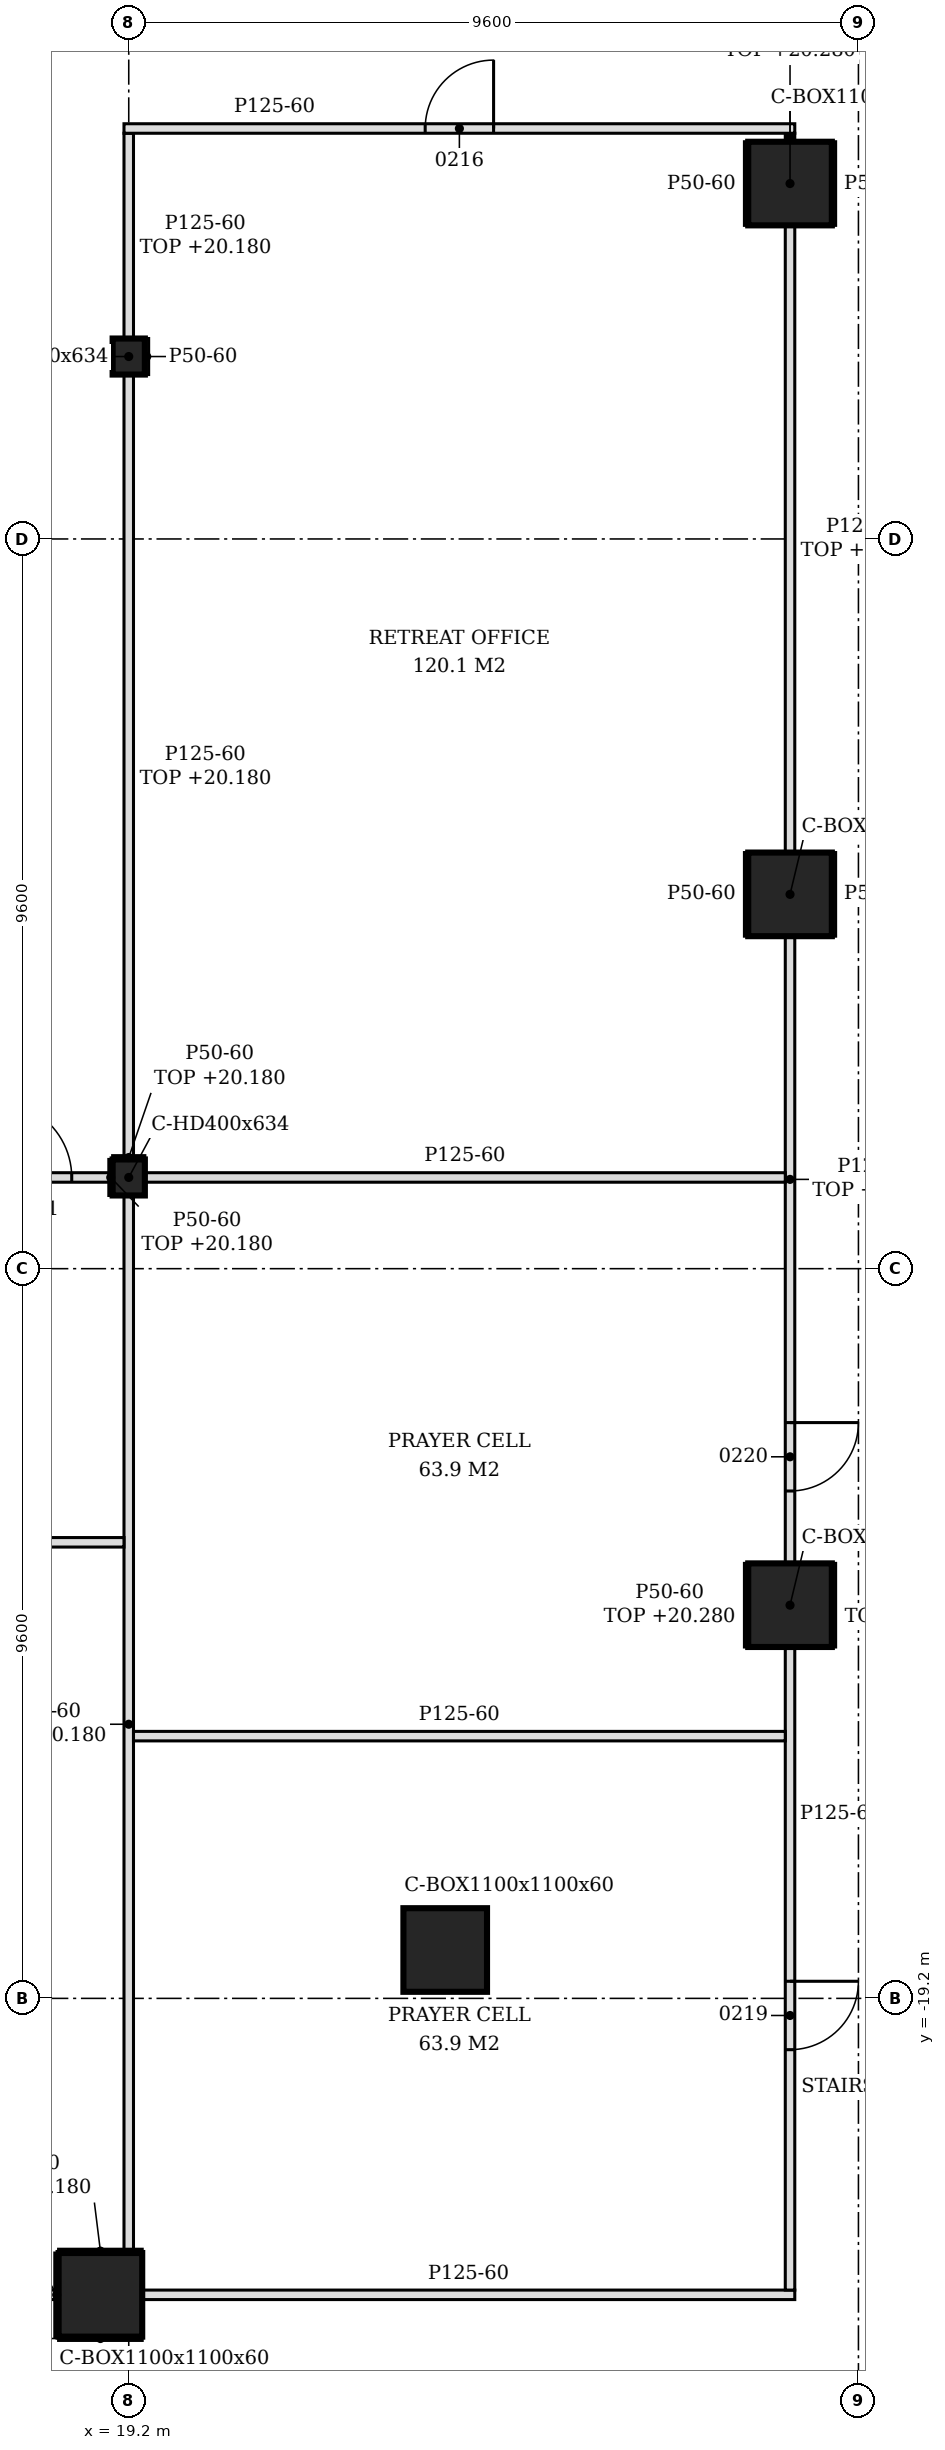
"""IFC4 building model, lengths in metres.
Left out: names, types, materials, properties, quantities, classifications, styles, units other than length and angle.
Written with IfcOpenShell. Run it as: python <this file> out.ifc"""

import sys

from ifc_helpers import new_model, si_unit, direction, frame, frame_2d, origin, origin_2d, place, context, subcontext, project, spatial, polyline, rectangle, hollow_rectangle, i_section, outline, extrude, element, fill, save


model = new_model("IFC4")
c1 = context("Model", 3, precision=1e-05, world=origin(), true_north=direction((0.0, 1.0)))
c2 = subcontext(c1, "Body", "Model", "MODEL_VIEW")
j1 = project(units=[si_unit("LENGTHUNIT", "METRE"), si_unit("PLANEANGLEUNIT", "RADIAN")], contexts=[c1])
p1 = place(None, origin())
s1 = spatial("IfcSite", under=j1, at=p1, CompositionType="ELEMENT")
p2 = place(p1, origin())
s2 = spatial("IfcBuilding", under=s1, at=p2, CompositionType="ELEMENT")
p3 = place(p2, frame((0.0, 0.0, 15.0)))
s3 = spatial("IfcBuildingStorey", under=s2, at=p3, CompositionType="ELEMENT", Elevation=15.0)
for number, where, z_axis, x_axis in (
    (1, (18.827, -23.1, -0.2), (0.0, 0.0, 1.0), (1.0, 0.0, 0.0)),
    (2, (23.364, -18.564, -0.2), (0.0, 0.0, 1.0), (1.0, 0.0, 0.0)),
    (3, (27.9, -14.027, -0.2), (0.0, 0.0, 1.0), (1.0, 0.0, 0.0)),
    (4, (27.9, -4.676, -0.2), (0.0, 0.0, 1.0), (1.0, 0.0, 0.0)),
    (5, (27.9, 4.676, -0.2), (0.0, 0.0, 1.0), (1.0, 0.0, 0.0)),
):
    element("IfcColumn", number, at=place(p3, frame(where, z_axis=z_axis, x_axis=x_axis)), inside=s3, PredefinedType="COLUMN", context=c2, shape_type="SweptSolid", body=[
        extrude(hollow_rectangle(XDim=1.1, YDim=1.1, WallThickness=0.06, at=origin_2d()), origin(), (0.0, 0.0, 1.0), 6.0),
    ])
for number, where, z_axis, x_axis in (
    (6, (19.2, -8.4, -0.2), (0.0, 0.0, 1.0), (1.0, 0.0, 0.0)),
    (7, (19.2, 2.4, -0.2), (0.0, 0.0, 1.0), (1.0, 0.0, 0.0)),
):
    element("IfcColumn", number, at=place(p3, frame(where, z_axis=z_axis, x_axis=x_axis)), inside=s3, PredefinedType="COLUMN", context=c2, shape_type="SweptSolid", body=[
        extrude(i_section(OverallWidth=0.424, OverallDepth=0.474, WebThickness=0.048, FlangeThickness=0.077, FilletRadius=0.015, at=origin_2d()), origin(), (0.0, 0.0, 1.0), 6.0),
    ])
p4 = place(p3, frame((9.964, -23.1, 0.0), z_axis=(0.0, 0.0, 1.0), x_axis=(1.0, 0.0, 0.0)))
e8 = element("IfcWall", 8, at=p4, inside=s3, PredefinedType="PARTITIONING", context=c2, shape_type="SweptSolid", body=[
    extrude(rectangle(XDim=8.313, YDim=0.125, at=frame_2d((4.157, 0.0))), origin(), (0.0, 0.0, 1.0), 5.28),
])
p5 = place(p4, frame((3.986, 0.0, 0.0)))
e9 = element("IfcOpeningElement", 9, at=p5, cuts=e8, PredefinedType="OPENING", context=c2, shape_type="SweptSolid", body=[
    extrude(rectangle(XDim=0.9, YDim=2.1, at=frame_2d((0.45, 1.05))), frame((0.0, 0.073, 0.0), z_axis=(0.0, -1.0, 0.0), x_axis=(1.0, 0.0, 0.0)), (0.0, 0.0, 1.0), 0.145),
])
p6 = place(p3, frame((19.377, -23.1, 0.0), z_axis=(0.0, 0.0, 1.0), x_axis=(1.0, 0.0, 0.0)))
e10 = element("IfcWall", 10, at=p6, inside=s3, PredefinedType="PARTITIONING", context=c2, shape_type="SweptSolid", body=[
    extrude(rectangle(XDim=8.585, YDim=0.125, at=frame_2d((4.292, 0.0))), origin(), (0.0, 0.0, 1.0), 5.8),
])
p7 = place(p3, frame((27.9, -23.038, 0.0), z_axis=(0.0, 0.0, 1.0), x_axis=(0.0, 1.0, 0.0)))
e11 = element("IfcWall", 11, at=p7, inside=s3, PredefinedType="PARTITIONING", context=c2, shape_type="SweptSolid", body=[
    extrude(outline(polyline([(0.0, 0.0), (8.46, 0.0), (8.46, 5.8), (3.927, 5.8), (3.926, 5.38), (3.748, 5.38), (3.746, 5.8), (0.0, 5.8), (0.0, 0.0)])), frame((0.0, 0.062, 0.0), z_axis=(0.0, -1.0, 0.0), x_axis=(1.0, 0.0, 0.0)), (0.0, 0.0, 1.0), 0.125),
])
p8 = place(p7, frame((3.163, 0.0, 0.0)))
e12 = element("IfcOpeningElement", 12, at=p8, cuts=e11, PredefinedType="OPENING", context=c2, shape_type="SweptSolid", body=[
    extrude(rectangle(XDim=0.9, YDim=2.1, at=frame_2d((0.45, 1.05))), frame((0.0, 0.073, 0.0), z_axis=(0.0, -1.0, 0.0), x_axis=(1.0, 0.0, 0.0)), (0.0, 0.0, 1.0), 0.145),
])
p9 = place(p3, frame((19.2, -22.55, 0.0), z_axis=(0.0, 0.0, 1.0), x_axis=(0.0, 1.0, 0.0)))
e13 = element("IfcWall", 13, at=p9, inside=s3, PredefinedType="PARTITIONING", context=c2, shape_type="SweptSolid", body=[
    extrude(rectangle(XDim=13.913, YDim=0.125, at=frame_2d((6.957, 0.0))), origin(), (0.0, 0.0, 1.0), 5.18),
])
p10 = place(p3, frame((19.262, -15.75, 0.0), z_axis=(0.0, 0.0, 1.0), x_axis=(1.0, 0.0, 0.0)))
e14 = element("IfcWall", 14, at=p10, inside=s3, PredefinedType="PARTITIONING", context=c2, shape_type="SweptSolid", body=[
    extrude(outline(polyline([(0.0, 0.0), (8.575, 0.0), (8.575, 5.8), (7.189, 5.8), (7.187, 5.28), (6.64, 5.28), (6.638, 5.8), (0.087, 5.8), (0.085, 5.18), (0.0, 5.18), (0.0, 0.0)])), frame((0.0, 0.062, 0.0), z_axis=(0.0, -1.0, 0.0), x_axis=(1.0, 0.0, 0.0)), (0.0, 0.0, 1.0), 0.125),
])
p11 = place(p3, frame((27.9, -13.477, 0.0), z_axis=(0.0, 0.0, 1.0), x_axis=(0.0, 1.0, 0.0)))
e15 = element("IfcWall", 15, at=p11, inside=s3, PredefinedType="PARTITIONING", context=c2, shape_type="SweptSolid", body=[
    extrude(rectangle(XDim=8.252, YDim=0.125, at=frame_2d((4.126, 0.0))), origin(), (0.0, 0.0, 1.0), 5.28),
])
p12 = place(p11, frame((0.952, 0.0, 0.0)))
e16 = element("IfcOpeningElement", 16, at=p12, cuts=e15, PredefinedType="OPENING", context=c2, shape_type="SweptSolid", body=[
    extrude(rectangle(XDim=0.9, YDim=2.1, at=frame_2d((0.45, 1.05))), frame((0.0, 0.073, 0.0), z_axis=(0.0, -1.0, 0.0), x_axis=(1.0, 0.0, 0.0)), (0.0, 0.0, 1.0), 0.145),
])
p13 = place(p3, frame((-4.738, -13.2, 0.0), z_axis=(0.0, 0.0, 1.0), x_axis=(1.0, 0.0, 0.0)))
e17 = element("IfcWall", 17, at=p13, inside=s3, PredefinedType="PARTITIONING", context=c2, shape_type="SweptSolid", body=[
    extrude(outline(polyline([(0.0, 0.0), (23.875, 0.0), (23.875, 5.18), (23.788, 5.18), (23.785, 5.8), (19.288, 5.8), (19.285, 5.18), (18.988, 5.18), (18.986, 5.8), (14.488, 5.8), (14.486, 5.18), (14.188, 5.18), (14.186, 5.8), (9.688, 5.8), (9.686, 5.18), (9.387, 5.18), (9.385, 5.8), (4.887, 5.8), (4.885, 5.18), (4.587, 5.18), (4.585, 5.8), (0.087, 5.8), (0.085, 5.18), (0.0, 5.18), (0.0, 0.0)])), frame((0.0, 0.062, 0.0), z_axis=(0.0, -1.0, 0.0), x_axis=(1.0, 0.0, 0.0)), (0.0, 0.0, 1.0), 0.125),
])
p14 = place(p3, frame((7.412, -8.4, 0.0), z_axis=(0.0, 0.0, 1.0), x_axis=(1.0, 0.0, 0.0)))
e18 = element("IfcWall", 18, at=p14, inside=s3, PredefinedType="PARTITIONING", context=c2, shape_type="SweptSolid", body=[
    extrude(rectangle(XDim=11.576, YDim=0.125, at=frame_2d((5.788, 0.0))), origin(), (0.0, 0.0, 1.0), 5.18),
])
p15 = place(p14, frame((4.138, 0.0, 0.0)))
e19 = element("IfcOpeningElement", 19, at=p15, cuts=e18, PredefinedType="OPENING", context=c2, shape_type="SweptSolid", body=[
    extrude(rectangle(XDim=0.8, YDim=2.1, at=frame_2d((0.4, 1.05))), frame((0.0, 0.073, 0.0), z_axis=(0.0, -1.0, 0.0), x_axis=(1.0, 0.0, 0.0)), (0.0, 0.0, 1.0), 0.145),
])
p16 = place(p14, frame((10.038, 0.0, 0.0)))
e20 = element("IfcOpeningElement", 20, at=p16, cuts=e18, PredefinedType="OPENING", context=c2, shape_type="SweptSolid", body=[
    extrude(rectangle(XDim=1.0, YDim=2.1, at=frame_2d((0.5, 1.05))), frame((0.0, 0.073, 0.0), z_axis=(0.0, -1.0, 0.0), x_axis=(1.0, 0.0, 0.0)), (0.0, 0.0, 1.0), 0.145),
])
p17 = place(p3, frame((19.412, -8.4, 0.0), z_axis=(0.0, 0.0, 1.0), x_axis=(1.0, 0.0, 0.0)))
e21 = element("IfcWall", 21, at=p17, inside=s3, PredefinedType="PARTITIONING", context=c2, shape_type="SweptSolid", body=[
    extrude(outline(polyline([(0.0, 0.0), (8.425, 0.0), (8.426, 5.28), (8.338, 5.28), (8.336, 5.8), (0.0, 5.8), (0.0, 0.0)])), frame((0.0, 0.062, 0.0), z_axis=(0.0, -1.0, 0.0), x_axis=(1.0, 0.0, 0.0)), (0.0, 0.0, 1.0), 0.125),
])
p18 = place(p3, frame((19.2, -8.163, 0.0), z_axis=(0.0, 0.0, 1.0), x_axis=(0.0, 1.0, 0.0)))
e22 = element("IfcWall", 22, at=p18, inside=s3, PredefinedType="PARTITIONING", context=c2, shape_type="SweptSolid", body=[
    extrude(rectangle(XDim=10.326, YDim=0.125, at=frame_2d((5.163, 0.0))), origin(), (0.0, 0.0, 1.0), 5.18),
])
p19 = place(p3, frame((27.9, -4.126, 0.0), z_axis=(0.0, 0.0, 1.0), x_axis=(0.0, 1.0, 0.0)))
e23 = element("IfcWall", 23, at=p19, inside=s3, PredefinedType="PARTITIONING", context=c2, shape_type="SweptSolid", body=[
    extrude(rectangle(XDim=8.251, YDim=0.125, at=frame_2d((4.126, 0.0))), origin(), (0.0, 0.0, 1.0), 5.28),
])
p20 = place(p3, frame((19.2, 2.637, 0.0), z_axis=(0.0, 0.0, 1.0), x_axis=(0.0, 1.0, 0.0)))
e24 = element("IfcWall", 24, at=p20, inside=s3, PredefinedType="PARTITIONING", context=c2, shape_type="SweptSolid", body=[
    extrude(rectangle(XDim=2.7, YDim=0.125, at=frame_2d((1.35, 0.0))), origin(), (0.0, 0.0, 1.0), 5.18),
])
p21 = place(p3, frame((27.9, 5.226, 0.0), z_axis=(0.0, 0.0, 1.0), x_axis=(0.0, 1.0, 0.0)))
e25 = element("IfcWall", 25, at=p21, inside=s3, PredefinedType="PARTITIONING", context=c2, shape_type="SweptSolid", body=[
    extrude(rectangle(XDim=0.112, YDim=0.125, at=frame_2d((0.056, 0.0))), origin(), (0.0, 0.0, 1.0), 5.28),
])
p22 = place(p3, frame((19.137, 5.4, 0.0), z_axis=(0.0, 0.0, 1.0), x_axis=(1.0, 0.0, 0.0)))
e26 = element("IfcWall", 26, at=p22, inside=s3, PredefinedType="PARTITIONING", context=c2, shape_type="SweptSolid", body=[
    extrude(outline(polyline([(0.0, 0.0), (8.825, 0.0), (8.825, 5.28), (8.613, 5.28), (8.611, 5.8), (4.962, 5.8), (4.96, 5.28), (4.762, 5.28), (4.76, 5.8), (0.212, 5.8), (0.21, 5.18), (0.0, 5.18), (0.0, 0.0)])), frame((0.0, 0.062, 0.0), z_axis=(0.0, -1.0, 0.0), x_axis=(1.0, 0.0, 0.0)), (0.0, 0.0, 1.0), 0.125),
])
p23 = place(p22, frame((3.962, 0.0, 0.0)))
e27 = element("IfcOpeningElement", 27, at=p23, cuts=e26, PredefinedType="OPENING", context=c2, shape_type="SweptSolid", body=[
    extrude(rectangle(XDim=0.9, YDim=2.1, at=frame_2d((0.45, 1.05))), frame((0.0, 0.073, 0.0), z_axis=(0.0, -1.0, 0.0), x_axis=(1.0, 0.0, 0.0)), (0.0, 0.0, 1.0), 0.145),
])
p24 = place(p3, frame((18.277, -22.525, 0.0), z_axis=(0.0, 0.0, 1.0), x_axis=(1.0, 0.0, 0.0)))
e28 = element("IfcWall", 28, at=p24, inside=s3, PredefinedType="PARTITIONING", context=c2, shape_type="SweptSolid", body=[
    extrude(rectangle(XDim=1.1, YDim=0.05, at=frame_2d((0.55, 0.0))), origin(), (0.0, 0.0, 1.0), 5.18),
])
p25 = place(p3, frame((18.277, -23.675, 0.0), z_axis=(0.0, 0.0, 1.0), x_axis=(1.0, 0.0, 0.0)))
e29 = element("IfcWall", 29, at=p25, inside=s3, PredefinedType="PARTITIONING", context=c2, shape_type="SweptSolid", body=[
    extrude(rectangle(XDim=1.1, YDim=0.05, at=frame_2d((0.55, 0.0))), origin(), (0.0, 0.0, 1.0), 5.42),
])
p26 = place(p3, frame((18.252, -23.65, 0.0), z_axis=(0.0, 0.0, 1.0), x_axis=(0.0, 1.0, 0.0)))
e30 = element("IfcWall", 30, at=p26, inside=s3, PredefinedType="PARTITIONING", context=c2, shape_type="SweptSolid", body=[
    extrude(rectangle(XDim=1.1, YDim=0.05, at=frame_2d((0.55, 0.0))), origin(), (0.0, 0.0, 1.0), 5.28),
])
p27 = place(p3, frame((18.963, -8.637, 0.0), z_axis=(0.0, 0.0, 1.0), x_axis=(0.0, 1.0, 0.0)))
e31 = element("IfcWall", 31, at=p27, inside=s3, PredefinedType="PARTITIONING", context=c2, shape_type="SweptSolid", body=[
    extrude(rectangle(XDim=0.474, YDim=0.05, at=frame_2d((0.237, 0.0))), origin(), (0.0, 0.0, 1.0), 5.18),
])
for number, where, z_axis, x_axis in (
    (32, (27.325, -14.577, 0.0), (0.0, 0.0, 1.0), (0.0, 1.0, 0.0)),
    (33, (28.475, -14.577, 0.0), (0.0, 0.0, 1.0), (0.0, 1.0, 0.0)),
):
    element("IfcWall", number, at=place(p3, frame(where, z_axis=z_axis, x_axis=x_axis)), inside=s3, PredefinedType="PARTITIONING", context=c2, shape_type="SweptSolid", body=[
        extrude(rectangle(XDim=1.1, YDim=0.05, at=frame_2d((0.55, 0.0))), origin(), (0.0, 0.0, 1.0), 5.28),
    ])
for number, where, z_axis, x_axis in (
    (34, (27.325, -5.226, 0.0), (0.0, 0.0, 1.0), (0.0, 1.0, 0.0)),
    (35, (28.475, -5.226, 0.0), (0.0, 0.0, 1.0), (0.0, 1.0, 0.0)),
    (36, (27.325, 4.126, 0.0), (0.0, 0.0, 1.0), (0.0, 1.0, 0.0)),
    (37, (28.475, 4.126, 0.0), (0.0, 0.0, 1.0), (0.0, 1.0, 0.0)),
):
    element("IfcWall", number, at=place(p3, frame(where, z_axis=z_axis, x_axis=x_axis)), inside=s3, PredefinedType="PARTITIONING", context=c2, shape_type="SweptSolid", body=[
        extrude(rectangle(XDim=1.1, YDim=0.05, at=frame_2d((0.55, 0.0))), origin(), (0.0, 0.0, 1.0), 5.8),
    ])
p28 = place(p3, frame((18.988, -8.138, 0.0), z_axis=(0.0, 0.0, 1.0), x_axis=(1.0, 0.0, 0.0)))
e38 = element("IfcWall", 38, at=p28, inside=s3, PredefinedType="PARTITIONING", context=c2, shape_type="SweptSolid", body=[
    extrude(rectangle(XDim=0.424, YDim=0.05, at=frame_2d((0.212, 0.0))), origin(), (0.0, 0.0, 1.0), 5.18),
])
p29 = place(p3, frame((19.437, 2.163, 0.0), z_axis=(0.0, 0.0, 1.0), x_axis=(0.0, 1.0, 0.0)))
e39 = element("IfcWall", 39, at=p29, inside=s3, PredefinedType="PARTITIONING", context=c2, shape_type="SweptSolid", body=[
    extrude(rectangle(XDim=0.474, YDim=0.05, at=frame_2d((0.237, 0.0))), origin(), (0.0, 0.0, 1.0), 5.8),
])
p30 = place(p16, origin())
e40 = element("IfcDoor", 40, at=p30, inside=s3, OperationType="SINGLE_SWING_LEFT", PredefinedType="DOOR", context=c2, shape_type="SweptSolid", body=[
    extrude(rectangle(XDim=1.0, YDim=2.1, at=frame_2d((0.5, 1.05))), frame((0.0, 0.025, 0.0), z_axis=(0.0, -1.0, 0.0), x_axis=(1.0, 0.0, 0.0)), (0.0, 0.0, 1.0), 0.05),
])
fill(e20, e40)
p31 = place(p23, origin())
e41 = element("IfcDoor", 41, at=p31, inside=s3, OperationType="SINGLE_SWING_RIGHT", PredefinedType="DOOR", context=c2, shape_type="SweptSolid", body=[
    extrude(rectangle(XDim=0.9, YDim=2.1, at=frame_2d((0.45, 1.05))), frame((0.0, 0.025, 0.0), z_axis=(0.0, -1.0, 0.0), x_axis=(1.0, 0.0, 0.0)), (0.0, 0.0, 1.0), 0.05),
])
fill(e27, e41)
p32 = place(p8, frame((0.9, 0.0, 0.0), z_axis=(0.0, 0.0, 1.0), x_axis=(-1.0, 0.0, 0.0)))
e42 = element("IfcDoor", 42, at=p32, inside=s3, OperationType="SINGLE_SWING_LEFT", PredefinedType="DOOR", context=c2, shape_type="SweptSolid", body=[
    extrude(rectangle(XDim=0.9, YDim=2.1, at=frame_2d((0.45, 1.05))), frame((0.0, 0.025, 0.0), z_axis=(0.0, -1.0, 0.0), x_axis=(1.0, 0.0, 0.0)), (0.0, 0.0, 1.0), 0.05),
])
fill(e12, e42)
p33 = place(p12, frame((0.9, 0.0, 0.0), z_axis=(0.0, 0.0, 1.0), x_axis=(-1.0, 0.0, 0.0)))
e43 = element("IfcDoor", 43, at=p33, inside=s3, OperationType="SINGLE_SWING_LEFT", PredefinedType="DOOR", context=c2, shape_type="SweptSolid", body=[
    extrude(rectangle(XDim=0.9, YDim=2.1, at=frame_2d((0.45, 1.05))), frame((0.0, 0.025, 0.0), z_axis=(0.0, -1.0, 0.0), x_axis=(1.0, 0.0, 0.0)), (0.0, 0.0, 1.0), 0.05),
])
fill(e16, e43)
save(model, sys.argv[1])
